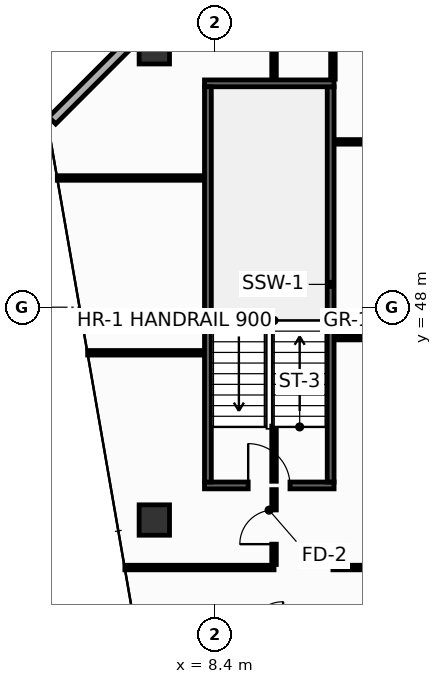
"""IFC4 building model, lengths in metres.
Left out: names, types, materials, properties, quantities, classifications, styles, units other than length and angle.
Written with IfcOpenShell. Run it as: python <this file> out.ifc"""

import sys

from ifc_helpers import new_model, si_unit, direction, frame, frame_2d, origin, origin_2d, place, context, subcontext, project, spatial, rectangle, hollow_rectangle, extrude, element, fill, save


model = new_model("IFC4")
c1 = context("Model", 3, precision=1e-05, world=origin(), true_north=direction((0.0, 1.0)))
c2 = subcontext(c1, "Body", "Model", "MODEL_VIEW")
j1 = project(units=[si_unit("LENGTHUNIT", "METRE"), si_unit("PLANEANGLEUNIT", "RADIAN")], contexts=[c1])
p1 = place(None, origin())
s1 = spatial("IfcSite", under=j1, at=p1, CompositionType="ELEMENT")
p2 = place(p1, origin())
s2 = spatial("IfcBuilding", under=s1, at=p2, CompositionType="ELEMENT")
p3 = place(p2, frame((0.0, 0.0, 249.6)))
s3 = spatial("IfcBuildingStorey", under=s2, at=p3, CompositionType="ELEMENT", Elevation=249.6)
for number, where, z_axis, x_axis in (
    (1, (6.8, 54.8, 0.0), (0.0, 0.0, 1.0), (1.0, 0.0, 0.0)),
    (2, (6.8, 42.4, 0.0), (0.0, 0.0, 1.0), (1.0, 0.0, 0.0)),
):
    element("IfcColumn", number, at=place(p3, frame(where, z_axis=z_axis, x_axis=x_axis)), inside=s3, PredefinedType="COLUMN", context=c2, shape_type="SweptSolid", body=[
        extrude(hollow_rectangle(XDim=0.8, YDim=0.8, WallThickness=0.036, at=origin_2d()), origin(), (0.0, 0.0, 1.0), 3.8),
    ])
p4 = place(p3, frame((8.12, 43.31, 0.0), z_axis=(0.0, 0.0, 1.0), x_axis=(1.0, 0.0, 0.0)))
e3 = element("IfcWall", 3, at=p4, inside=s3, PredefinedType="SHEAR", context=c2, shape_type="SweptSolid", body=[
    extrude(rectangle(XDim=3.41, YDim=0.18, at=frame_2d((1.705, 0.0))), origin(), (0.0, 0.0, 1.0), 3.35),
])
p5 = place(p4, frame((1.15, 0.0, 0.0)))
e4 = element("IfcOpeningElement", 4, at=p5, cuts=e3, PredefinedType="OPENING", context=c2, shape_type="SweptSolid", body=[
    extrude(rectangle(XDim=1.1, YDim=2.15, at=frame_2d((0.55, 1.075))), frame((0.0, 0.1, 0.0), z_axis=(0.0, -1.0, 0.0), x_axis=(1.0, 0.0, 0.0)), (0.0, 0.0, 1.0), 0.2),
])
p6 = place(p3, frame((11.44, 43.4, 0.0), z_axis=(0.0, 0.0, 1.0), x_axis=(0.0, 1.0, 0.0)))
e5 = element("IfcWall", 5, at=p6, inside=s3, PredefinedType="SHEAR", context=c2, shape_type="SweptSolid", body=[
    extrude(rectangle(XDim=10.4, YDim=0.18, at=frame_2d((5.2, 0.0))), origin(), (0.0, 0.0, 1.0), 3.35),
])
p7 = place(p3, frame((11.53, 53.89, 0.0), z_axis=(0.0, 0.0, 1.0), x_axis=(-1.0, 0.0, 0.0)))
e6 = element("IfcWall", 6, at=p7, inside=s3, PredefinedType="SHEAR", context=c2, shape_type="SweptSolid", body=[
    extrude(rectangle(XDim=3.41, YDim=0.18, at=frame_2d((1.705, 0.0))), origin(), (0.0, 0.0, 1.0), 3.35),
])
p8 = place(p3, frame((8.21, 53.8, 0.0), z_axis=(0.0, 0.0, 1.0), x_axis=(0.0, -1.0, 0.0)))
e7 = element("IfcWall", 7, at=p8, inside=s3, PredefinedType="SHEAR", context=c2, shape_type="SweptSolid", body=[
    extrude(rectangle(XDim=10.4, YDim=0.18, at=frame_2d((5.2, 0.0))), origin(), (0.0, 0.0, 1.0), 3.35),
])
p9 = place(p3, frame((7.087, 55.887, 0.0), z_axis=(0.0, 0.0, 1.0), x_axis=(-0.707106781187, -0.707106781187, 0.0)))
e8 = element("IfcWall", 8, at=p9, inside=s3, PredefinedType="STANDARD", context=c2, shape_type="SweptSolid", body=[
    extrude(rectangle(XDim=4.206, YDim=0.26, at=frame_2d((2.103, 0.0))), origin(), (0.0, 0.0, 1.0), 3.35),
])
p10 = place(p3, frame((6.024, 41.15, 0.0), z_axis=(0.0, 0.0, 1.0), x_axis=(1.0, 0.0, 0.0)))
e9 = element("IfcWall", 9, at=p10, inside=s3, PredefinedType="PARTITIONING", context=c2, shape_type="SweptSolid", body=[
    extrude(rectangle(XDim=3.926, YDim=0.12, at=frame_2d((1.963, 0.0))), origin(), (0.0, 0.0, 1.0), 2.885),
])
p11 = place(p3, frame((11.5, 41.15, 0.0), z_axis=(0.0, 0.0, 1.0), x_axis=(1.0, 0.0, 0.0)))
e10 = element("IfcWall", 10, at=p11, inside=s3, PredefinedType="PARTITIONING", context=c2, shape_type="SweptSolid", body=[
    extrude(rectangle(XDim=2.35, YDim=0.12, at=frame_2d((1.175, 0.0))), origin(), (0.0, 0.0, 1.0), 3.35),
])
p12 = place(p3, frame((11.55, 52.35, 0.0), z_axis=(0.0, 0.0, 1.0), x_axis=(1.0, 0.0, 0.0)))
e11 = element("IfcWall", 11, at=p12, inside=s3, PredefinedType="PARTITIONING", context=c2, shape_type="SweptSolid", body=[
    extrude(rectangle(XDim=2.13, YDim=0.12, at=frame_2d((1.065, 0.0))), origin(), (0.0, 0.0, 1.0), 3.35),
])
p13 = place(p3, frame((11.5, 54.0, 0.0), z_axis=(0.0, 0.0, 1.0), x_axis=(0.0, 1.0, 0.0)))
e12 = element("IfcWall", 12, at=p13, inside=s3, PredefinedType="PARTITIONING", context=c2, shape_type="SweptSolid", body=[
    extrude(rectangle(XDim=1.995, YDim=0.12, at=frame_2d((0.998, 0.0))), origin(), (0.0, 0.0, 1.0), 2.735),
])
p14 = place(p3, frame((5.045, 46.8, 0.0), z_axis=(0.0, 0.0, 1.0), x_axis=(1.0, 0.0, 0.0)))
e13 = element("IfcWall", 13, at=p14, inside=s3, PredefinedType="PARTITIONING", context=c2, shape_type="SweptSolid", body=[
    extrude(rectangle(XDim=3.055, YDim=0.12, at=frame_2d((1.527, 0.0))), origin(), (0.0, 0.0, 1.0), 2.747),
])
p15 = place(p3, frame((4.248, 51.4, 0.0), z_axis=(0.0, 0.0, 1.0), x_axis=(1.0, 0.0, 0.0)))
e14 = element("IfcWall", 14, at=p15, inside=s3, PredefinedType="PARTITIONING", context=c2, shape_type="SweptSolid", body=[
    extrude(rectangle(XDim=3.852, YDim=0.12, at=frame_2d((1.926, 0.0))), origin(), (0.0, 0.0, 1.0), 2.747),
])
p16 = place(p3, frame((9.95, 41.23, 0.0), z_axis=(0.0, 0.0, 1.0), x_axis=(0.0, 1.0, 0.0)))
e15 = element("IfcWall", 15, at=p16, inside=s3, PredefinedType="PARTITIONING", context=c2, shape_type="SweptSolid", body=[
    extrude(rectangle(XDim=1.97, YDim=0.12, at=frame_2d((0.985, 0.0))), origin(), (0.0, 0.0, 1.0), 2.747),
])
p17 = place(p16, frame((0.535, 0.0, 0.0)))
e16 = element("IfcOpeningElement", 16, at=p17, cuts=e15, PredefinedType="OPENING", context=c2, shape_type="SweptSolid", body=[
    extrude(rectangle(XDim=0.9, YDim=2.1, at=frame_2d((0.45, 1.05))), frame((0.0, 0.07, 0.0), z_axis=(0.0, -1.0, 0.0), x_axis=(1.0, 0.0, 0.0)), (0.0, 0.0, 1.0), 0.14),
])
p18 = place(p3, frame((9.95, 43.42, 0.0), z_axis=(0.0, 0.0, 1.0), x_axis=(0.0, 1.0, 0.0)))
e17 = element("IfcWall", 17, at=p18, inside=s3, PredefinedType="PARTITIONING", context=c2, shape_type="SweptSolid", body=[
    extrude(rectangle(XDim=1.45, YDim=0.12, at=frame_2d((0.725, 0.0))), origin(), (0.0, 0.0, 1.0), 3.35),
])
p19 = place(p3, frame((9.95, 54.0, 0.0), z_axis=(0.0, 0.0, 1.0), x_axis=(0.0, 1.0, 0.0)))
e18 = element("IfcWall", 18, at=p19, inside=s3, PredefinedType="PARTITIONING", context=c2, shape_type="SweptSolid", body=[
    extrude(rectangle(XDim=1.995, YDim=0.12, at=frame_2d((0.998, 0.0))), origin(), (0.0, 0.0, 1.0), 2.735),
])
p20 = place(p3, frame((11.55, 47.2, 0.0), z_axis=(0.0, 0.0, 1.0), x_axis=(1.0, 0.0, 0.0)))
e19 = element("IfcWall", 19, at=p20, inside=s3, PredefinedType="PARTITIONING", context=c2, shape_type="SweptSolid", body=[
    extrude(rectangle(XDim=2.13, YDim=0.12, at=frame_2d((1.065, 0.0))), origin(), (0.0, 0.0, 1.0), 3.35),
])
p21 = place(p5, origin())
e20 = element("IfcDoor", 20, at=p21, inside=s3, OperationType="SINGLE_SWING_LEFT", PredefinedType="DOOR", context=c2, shape_type="SweptSolid", body=[
    extrude(rectangle(XDim=1.1, YDim=2.15, at=frame_2d((0.55, 1.075))), frame((0.0, 0.025, 0.0), z_axis=(0.0, -1.0, 0.0), x_axis=(1.0, 0.0, 0.0)), (0.0, 0.0, 1.0), 0.05),
])
fill(e4, e20)
p22 = place(p17, origin())
e21 = element("IfcDoor", 21, at=p22, inside=s3, OperationType="SINGLE_SWING_LEFT", PredefinedType="DOOR", context=c2, shape_type="SweptSolid", body=[
    extrude(rectangle(XDim=0.9, YDim=2.1, at=frame_2d((0.45, 1.05))), frame((0.0, 0.025, 0.0), z_axis=(0.0, -1.0, 0.0), x_axis=(1.0, 0.0, 0.0)), (0.0, 0.0, 1.0), 0.05),
])
fill(e16, e21)
save(model, sys.argv[1])
